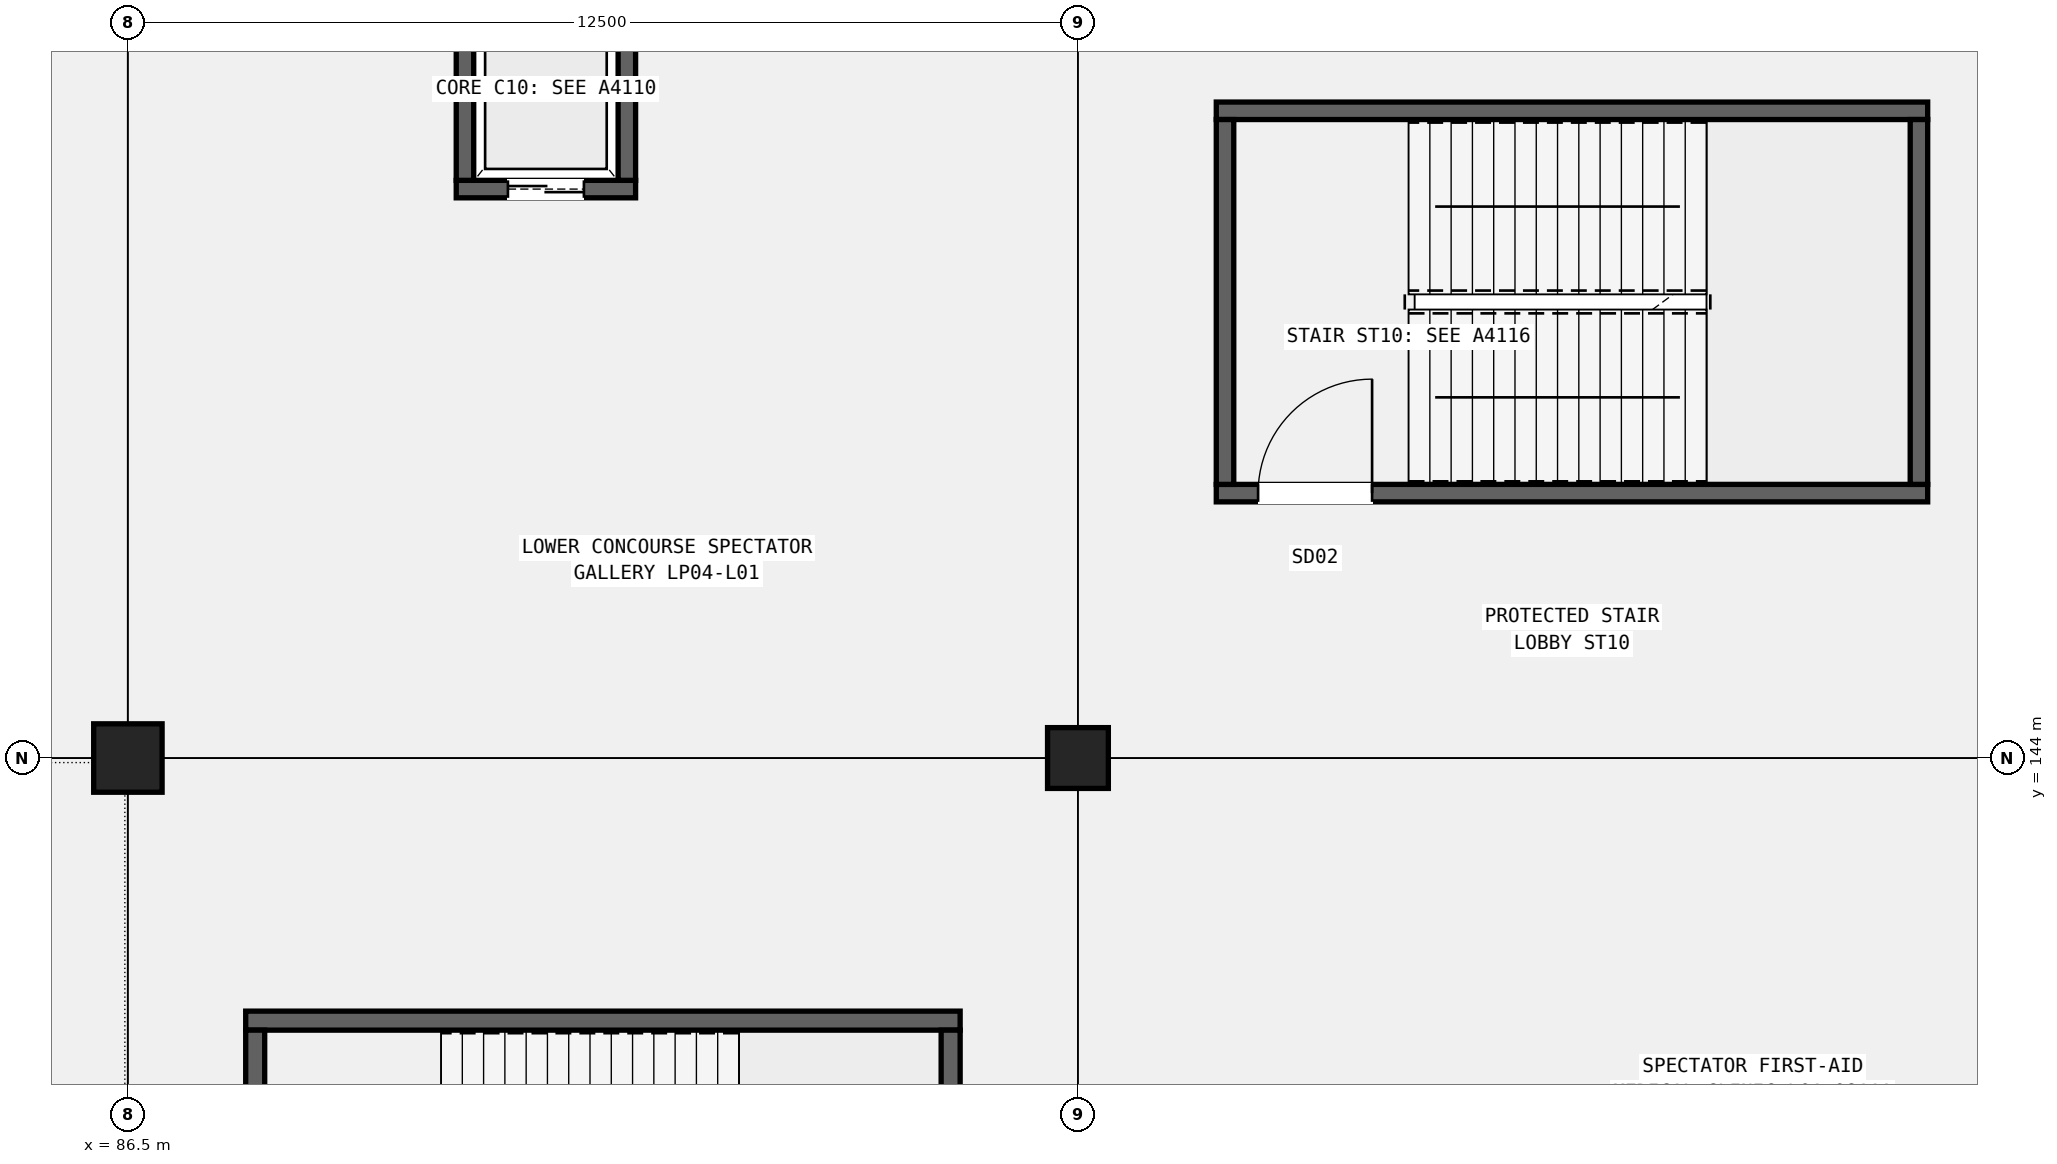
"""IFC4 building model, lengths in metres.
Left out: names, types, materials, properties, quantities, classifications, styles, units other than length and angle.
Written with IfcOpenShell. Run it as: python <this file> out.ifc"""

import sys

from ifc_helpers import new_model, si_unit, direction, frame, frame_2d, origin, origin_2d, place, context, subcontext, project, spatial, rectangle, extrude, element, fill, save


model = new_model("IFC4")
c1 = context("Model", 3, precision=1e-05, world=origin(), true_north=direction((0.0, 1.0)))
c2 = subcontext(c1, "Body", "Model", "MODEL_VIEW")
j1 = project(units=[si_unit("LENGTHUNIT", "METRE"), si_unit("PLANEANGLEUNIT", "RADIAN")], contexts=[c1])
p1 = place(None, origin())
s1 = spatial("IfcSite", under=j1, at=p1, CompositionType="ELEMENT")
p2 = place(p1, origin())
s2 = spatial("IfcBuilding", under=s1, at=p2, CompositionType="ELEMENT")
p3 = place(p2, frame((0.0, 0.0, 5.4)))
s3 = spatial("IfcBuildingStorey", under=s2, at=p3, CompositionType="ELEMENT", Elevation=5.4)
p4 = place(p3, frame((86.5, 144.0, 0.0), z_axis=(0.0, 0.0, 1.0), x_axis=(1.0, 0.0, 0.0)))
e1 = element("IfcColumn", 1, at=p4, inside=s3, PredefinedType="COLUMN", context=c2, shape_type="SweptSolid", body=[
    extrude(rectangle(XDim=0.9, YDim=0.9, at=origin_2d()), origin(), (0.0, 0.0, 1.0), 4.8),
])
p5 = place(p3, frame((99.0, 144.0, 0.0), z_axis=(0.0, 0.0, 1.0), x_axis=(1.0, 0.0, 0.0)))
e2 = element("IfcColumn", 2, at=p5, inside=s3, PredefinedType="COLUMN", context=c2, shape_type="SweptSolid", body=[
    extrude(rectangle(XDim=0.8, YDim=0.8, at=origin_2d()), origin(), (0.0, 0.0, 1.0), 4.8),
])
p6 = place(p3, frame((100.82, 147.485, 0.0), z_axis=(0.0, 0.0, 1.0), x_axis=(1.0, 0.0, 0.0)))
e3 = element("IfcWall", 3, at=p6, inside=s3, PredefinedType="SHEAR", context=c2, shape_type="SweptSolid", body=[
    extrude(rectangle(XDim=9.36, YDim=0.23, at=frame_2d((4.68, 0.0))), origin(), (0.0, 0.0, 1.0), 4.55),
])
p7 = place(p6, frame((0.55, 0.0, 0.0)))
e4 = element("IfcOpeningElement", 4, at=p7, cuts=e3, PredefinedType="OPENING", context=c2, shape_type="SweptSolid", body=[
    extrude(rectangle(XDim=1.5, YDim=2.2, at=frame_2d((0.75, 1.1))), frame((0.0, 0.125, 0.0), z_axis=(0.0, -1.0, 0.0), x_axis=(1.0, 0.0, 0.0)), (0.0, 0.0, 1.0), 0.25),
])
p8 = place(p3, frame((100.82, 152.515, 0.0), z_axis=(0.0, 0.0, 1.0), x_axis=(1.0, 0.0, 0.0)))
e5 = element("IfcWall", 5, at=p8, inside=s3, PredefinedType="SHEAR", context=c2, shape_type="SweptSolid", body=[
    extrude(rectangle(XDim=9.36, YDim=0.23, at=frame_2d((4.68, 0.0))), origin(), (0.0, 0.0, 1.0), 4.55),
])
for number, where, z_axis, x_axis in (
    (6, (100.935, 147.6, 0.0), (0.0, 0.0, 1.0), (0.0, 1.0, 0.0)),
    (7, (110.065, 147.6, 0.0), (0.0, 0.0, 1.0), (0.0, 1.0, 0.0)),
):
    element("IfcWall", number, at=place(p3, frame(where, z_axis=z_axis, x_axis=x_axis)), inside=s3, PredefinedType="SHEAR", context=c2, shape_type="SweptSolid", body=[
        extrude(rectangle(XDim=4.8, YDim=0.23, at=frame_2d((2.4, 0.0))), origin(), (0.0, 0.0, 1.0), 4.55),
    ])
p9 = place(p3, frame((88.05, 140.545, 0.0), z_axis=(0.0, 0.0, 1.0), x_axis=(1.0, 0.0, 0.0)))
e8 = element("IfcWall", 8, at=p9, inside=s3, PredefinedType="SHEAR", context=c2, shape_type="SweptSolid", body=[
    extrude(rectangle(XDim=9.4, YDim=0.25, at=frame_2d((4.7, 0.0))), origin(), (0.0, 0.0, 1.0), 4.55),
])
for number, where, z_axis, x_axis in (
    (9, (88.175, 135.58, 0.0), (0.0, 0.0, 1.0), (0.0, 1.0, 0.0)),
    (10, (97.325, 135.58, 0.0), (0.0, 0.0, 1.0), (0.0, 1.0, 0.0)),
):
    element("IfcWall", number, at=place(p3, frame(where, z_axis=z_axis, x_axis=x_axis)), inside=s3, PredefinedType="SHEAR", context=c2, shape_type="SweptSolid", body=[
        extrude(rectangle(XDim=4.84, YDim=0.25, at=frame_2d((2.42, 0.0))), origin(), (0.0, 0.0, 1.0), 4.55),
    ])
p10 = place(p3, frame((90.82, 151.485, 0.0), z_axis=(0.0, 0.0, 1.0), x_axis=(1.0, 0.0, 0.0)))
e11 = element("IfcWall", 11, at=p10, inside=s3, PredefinedType="SHEAR", context=c2, shape_type="SweptSolid", body=[
    extrude(rectangle(XDim=2.36, YDim=0.23, at=frame_2d((1.18, 0.0))), origin(), (0.0, 0.0, 1.0), 4.55),
])
p11 = place(p10, frame((0.68, 0.0, 0.0)))
e12 = element("IfcOpeningElement", 12, at=p11, cuts=e11, PredefinedType="OPENING", context=c2, shape_type="SweptSolid", body=[
    extrude(rectangle(XDim=1.0, YDim=2.15, at=frame_2d((0.5, 1.075))), frame((0.0, 0.125, 0.0), z_axis=(0.0, -1.0, 0.0), x_axis=(1.0, 0.0, 0.0)), (0.0, 0.0, 1.0), 0.25),
])
for number, where, z_axis, x_axis in (
    (13, (90.935, 151.6, 0.0), (0.0, 0.0, 1.0), (0.0, 1.0, 0.0)),
    (14, (93.065, 151.6, 0.0), (0.0, 0.0, 1.0), (0.0, 1.0, 0.0)),
):
    element("IfcWall", number, at=place(p3, frame(where, z_axis=z_axis, x_axis=x_axis)), inside=s3, PredefinedType="SHEAR", context=c2, shape_type="SweptSolid", body=[
        extrude(rectangle(XDim=2.4, YDim=0.23, at=frame_2d((1.2, 0.0))), origin(), (0.0, 0.0, 1.0), 4.55),
    ])
p12 = place(p7, origin())
e15 = element("IfcDoor", 15, at=p12, inside=s3, OperationType="SINGLE_SWING_RIGHT", PredefinedType="DOOR", context=c2, shape_type="SweptSolid", body=[
    extrude(rectangle(XDim=1.5, YDim=2.2, at=frame_2d((0.75, 1.1))), frame((0.0, 0.025, 0.0), z_axis=(0.0, -1.0, 0.0), x_axis=(1.0, 0.0, 0.0)), (0.0, 0.0, 1.0), 0.05),
])
fill(e4, e15)
p13 = place(p11, origin())
e16 = element("IfcDoor", 16, at=p13, inside=s3, OperationType="DOUBLE_DOOR_SLIDING", PredefinedType="DOOR", context=c2, shape_type="SweptSolid", body=[
    extrude(rectangle(XDim=1.0, YDim=2.15, at=frame_2d((0.5, 1.075))), frame((0.0, 0.025, 0.0), z_axis=(0.0, -1.0, 0.0), x_axis=(1.0, 0.0, 0.0)), (0.0, 0.0, 1.0), 0.05),
])
fill(e12, e16)
save(model, sys.argv[1])
